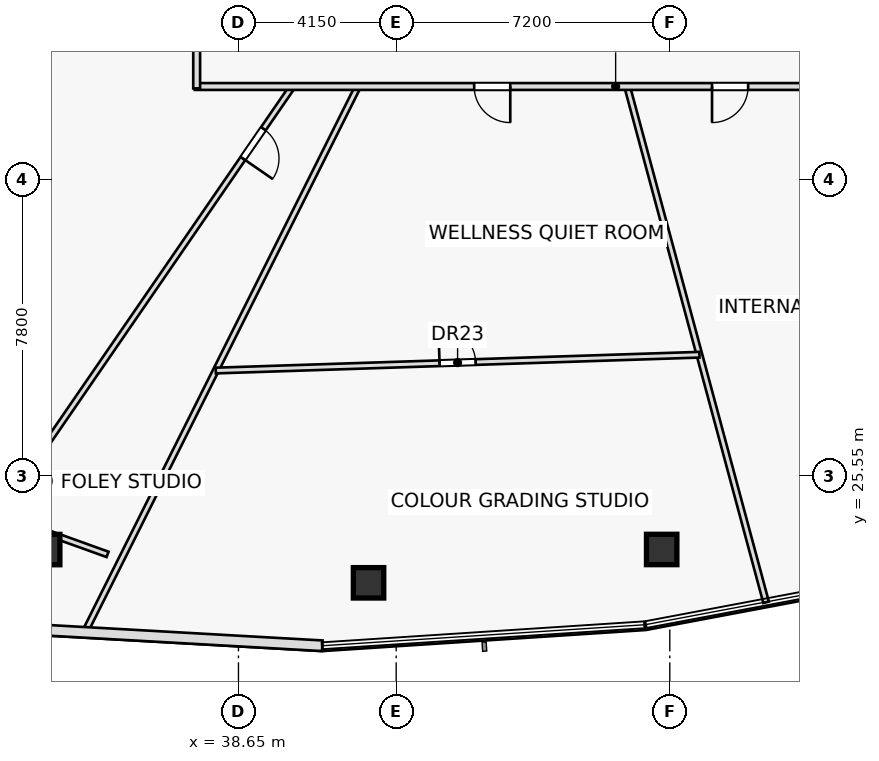
"""IFC4 building model, lengths in metres.
Left out: names, types, materials, properties, quantities, classifications, styles, units other than length and angle.
Written with IfcOpenShell. Run it as: python <this file> out.ifc"""

import sys

from ifc_helpers import new_model, si_unit, direction, frame, frame_2d, origin, origin_2d, place, context, subcontext, project, spatial, rectangle, hollow_rectangle, extrude, element, fill, save


model = new_model("IFC4")
c1 = context("Model", 3, precision=1e-05, world=origin(), true_north=direction((0.0, 1.0)))
c2 = subcontext(c1, "Body", "Model", "MODEL_VIEW")
j1 = project(units=[si_unit("LENGTHUNIT", "METRE"), si_unit("PLANEANGLEUNIT", "RADIAN")], contexts=[c1])
p1 = place(None, origin())
s1 = spatial("IfcSite", under=j1, at=p1, CompositionType="ELEMENT")
p2 = place(p1, origin())
s2 = spatial("IfcBuilding", under=s1, at=p2, CompositionType="ELEMENT")
p3 = place(p2, frame((0.0, 0.0, 54.9)))
s3 = spatial("IfcBuildingStorey", under=s2, at=p3, CompositionType="ELEMENT", Elevation=54.9)
for number, where, z_axis, x_axis in (
    (1, (33.551, 23.615, 0.0), (0.0, 0.0, 1.0), (1.0, 0.0, 0.0)),
    (2, (42.073, 22.74, 0.0), (0.0, 0.0, 1.0), (1.0, 0.0, 0.0)),
    (3, (49.787, 23.618, 0.0), (0.0, 0.0, 1.0), (1.0, 0.0, 0.0)),
):
    element("IfcColumn", number, at=place(p3, frame(where, z_axis=z_axis, x_axis=x_axis)), inside=s3, PredefinedType="COLUMN", context=c2, shape_type="SweptSolid", body=[
        extrude(hollow_rectangle(XDim=0.8, YDim=0.8, WallThickness=0.045, at=origin_2d()), origin(), (0.0, 0.0, 1.0), 3.6),
    ])
p4 = place(p3, frame((22.802, 27.945, 0.0), z_axis=(0.0, 0.0, 1.0), x_axis=(0.941102349209, -0.338121824662, 0.0)))
e4 = element("IfcWall", 4, at=p4, inside=s3, PredefinedType="PARTITIONING", context=c2, shape_type="SweptSolid", body=[
    extrude(rectangle(XDim=13.18, YDim=0.15, at=frame_2d((6.59, 0.0))), origin(), (0.0, 0.0, 1.0), 2.925),
])
p5 = place(p3, frame((37.55, 41.316, 0.0), z_axis=(0.0, 0.0, 1.0), x_axis=(-0.923192857612, -0.384337023528, 0.0)))
e5 = element("IfcWall", 5, at=p5, inside=s3, PredefinedType="PARTITIONING", context=c2, shape_type="SweptSolid", body=[
    extrude(rectangle(XDim=19.369, YDim=0.15, at=frame_2d((9.685, 0.0))), origin(), (0.0, 0.0, 1.0), 2.925),
])
p6 = place(p3, frame((40.07, 35.8, 0.0), z_axis=(0.0, 0.0, 1.0), x_axis=(-0.566803639282, -0.823852920427, 0.0)))
e6 = element("IfcWall", 6, at=p6, inside=s3, PredefinedType="PARTITIONING", context=c2, shape_type="SweptSolid", body=[
    extrude(rectangle(XDim=16.889, YDim=0.15, at=frame_2d((8.444, 0.0))), origin(), (0.0, 0.0, 1.0), 2.975),
])
p7 = place(p6, frame((1.35, 0.0, 0.0)))
e7 = element("IfcOpeningElement", 7, at=p7, cuts=e6, PredefinedType="OPENING", context=c2, shape_type="SweptSolid", body=[
    extrude(rectangle(XDim=0.95, YDim=2.05, at=frame_2d((0.475, 1.025))), frame((0.0, 0.085, 0.0), z_axis=(0.0, -1.0, 0.0), x_axis=(1.0, 0.0, 0.0)), (0.0, 0.0, 1.0), 0.17),
])
p8 = place(p3, frame((41.795, 35.8, 0.0), z_axis=(0.0, 0.0, 1.0), x_axis=(-0.447638840574, -0.894214442072, 0.0)))
e8 = element("IfcWall", 8, at=p8, inside=s3, PredefinedType="PARTITIONING", context=c2, shape_type="SweptSolid", body=[
    extrude(rectangle(XDim=16.073, YDim=0.15, at=frame_2d((8.037, 0.0))), origin(), (0.0, 0.0, 1.0), 2.975),
])
p9 = place(p3, frame((48.878, 35.8, 0.0), z_axis=(0.0, 0.0, 1.0), x_axis=(0.260097424476, -0.965582378558, 0.0)))
e9 = element("IfcWall", 9, at=p9, inside=s3, PredefinedType="PARTITIONING", context=c2, shape_type="SweptSolid", body=[
    extrude(rectangle(XDim=14.056, YDim=0.15, at=frame_2d((7.028, 0.0))), origin(), (0.0, 0.0, 1.0), 2.975),
])
p10 = place(p3, frame((38.053, 28.326, 0.0), z_axis=(0.0, 0.0, 1.0), x_axis=(0.999465503327, 0.032691094503, 0.0)))
e10 = element("IfcWall", 10, at=p10, inside=s3, PredefinedType="PARTITIONING", context=c2, shape_type="SweptSolid", body=[
    extrude(rectangle(XDim=12.733, YDim=0.15, at=frame_2d((6.367, 0.0))), origin(), (0.0, 0.0, 1.0), 2.925),
])
p11 = place(p10, frame((5.892, 0.0, 0.0)))
e11 = element("IfcOpeningElement", 11, at=p11, cuts=e10, PredefinedType="OPENING", context=c2, shape_type="SweptSolid", body=[
    extrude(rectangle(XDim=0.95, YDim=2.05, at=frame_2d((0.475, 1.025))), frame((0.0, 0.085, 0.0), z_axis=(0.0, -1.0, 0.0), x_axis=(1.0, 0.0, 0.0)), (0.0, 0.0, 1.0), 0.17),
])
p12 = place(p3, frame((59.65, 35.8, 0.0), z_axis=(0.0, 0.0, 1.0), x_axis=(-1.0, 0.0, 0.0)))
e12 = element("IfcWall", 12, at=p12, inside=s3, PredefinedType="PARTITIONING", context=c2, shape_type="SweptSolid", body=[
    extrude(rectangle(XDim=22.15, YDim=0.18, at=frame_2d((11.075, 0.0))), origin(), (0.0, 0.0, 1.0), 2.925),
])
p13 = place(p12, frame((2.493, 0.0, 0.0)))
e13 = element("IfcOpeningElement", 13, at=p13, cuts=e12, PredefinedType="OPENING", context=c2, shape_type="SweptSolid", body=[
    extrude(rectangle(XDim=0.95, YDim=2.05, at=frame_2d((0.475, 1.025))), frame((0.0, 0.1, 0.0), z_axis=(0.0, -1.0, 0.0), x_axis=(1.0, 0.0, 0.0)), (0.0, 0.0, 1.0), 0.2),
])
p14 = place(p12, frame((7.588, 0.0, 0.0)))
e14 = element("IfcOpeningElement", 14, at=p14, cuts=e12, PredefinedType="OPENING", context=c2, shape_type="SweptSolid", body=[
    extrude(rectangle(XDim=0.95, YDim=2.05, at=frame_2d((0.475, 1.025))), frame((0.0, 0.1, 0.0), z_axis=(0.0, -1.0, 0.0), x_axis=(1.0, 0.0, 0.0)), (0.0, 0.0, 1.0), 0.2),
])
p15 = place(p12, frame((13.848, 0.0, 0.0)))
e15 = element("IfcOpeningElement", 15, at=p15, cuts=e12, PredefinedType="OPENING", context=c2, shape_type="SweptSolid", body=[
    extrude(rectangle(XDim=0.95, YDim=2.05, at=frame_2d((0.475, 1.025))), frame((0.0, 0.1, 0.0), z_axis=(0.0, -1.0, 0.0), x_axis=(1.0, 0.0, 0.0)), (0.0, 0.0, 1.0), 0.2),
])
p16 = place(p3, frame((37.55, 35.75, 0.0), z_axis=(0.0, 0.0, 1.0), x_axis=(0.0, 1.0, 0.0)))
e16 = element("IfcWall", 16, at=p16, inside=s3, PredefinedType="PARTITIONING", context=c2, shape_type="SweptSolid", body=[
    extrude(rectangle(XDim=12.75, YDim=0.18, at=frame_2d((6.375, 0.0))), origin(), (0.0, 0.0, 1.0), 2.925),
])
p17 = place(p16, frame((2.4, 0.0, 0.0)))
e17 = element("IfcOpeningElement", 17, at=p17, cuts=e16, PredefinedType="OPENING", context=c2, shape_type="SweptSolid", body=[
    extrude(rectangle(XDim=0.95, YDim=2.05, at=frame_2d((0.475, 1.025))), frame((0.0, 0.1, 0.0), z_axis=(0.0, -1.0, 0.0), x_axis=(1.0, 0.0, 0.0)), (0.0, 0.0, 1.0), 0.2),
])
p18 = place(p16, frame((8.547, 0.0, 0.0)))
e18 = element("IfcOpeningElement", 18, at=p18, cuts=e16, PredefinedType="OPENING", context=c2, shape_type="SweptSolid", body=[
    extrude(rectangle(XDim=0.95, YDim=2.05, at=frame_2d((0.475, 1.025))), frame((0.0, 0.1, 0.0), z_axis=(0.0, -1.0, 0.0), x_axis=(1.0, 0.0, 0.0)), (0.0, 0.0, 1.0), 0.2),
])
p19 = place(p3, frame((32.335, 21.564, 0.0), z_axis=(0.0, 0.0, 1.0), x_axis=(0.998416034421, -0.05626208502, 0.0)))
e19 = element("IfcWall", 19, at=p19, inside=s3, PredefinedType="STANDARD", context=c2, shape_type="SweptSolid", body=[
    extrude(rectangle(XDim=8.535, YDim=0.28, at=frame_2d((4.268, 0.0))), origin(), (0.0, 0.0, 1.0), 3.6),
])
p20 = place(p7, origin())
e20 = element("IfcDoor", 20, at=p20, inside=s3, OperationType="SINGLE_SWING_RIGHT", PredefinedType="DOOR", context=c2, shape_type="SweptSolid", body=[
    extrude(rectangle(XDim=0.95, YDim=2.05, at=frame_2d((0.475, 1.025))), frame((0.0, 0.025, 0.0), z_axis=(0.0, -1.0, 0.0), x_axis=(1.0, 0.0, 0.0)), (0.0, 0.0, 1.0), 0.05),
])
fill(e7, e20)
p21 = place(p11, origin())
e21 = element("IfcDoor", 21, at=p21, inside=s3, OperationType="SINGLE_SWING_LEFT", PredefinedType="DOOR", context=c2, shape_type="SweptSolid", body=[
    extrude(rectangle(XDim=0.95, YDim=2.05, at=frame_2d((0.475, 1.025))), frame((0.0, 0.025, 0.0), z_axis=(0.0, -1.0, 0.0), x_axis=(1.0, 0.0, 0.0)), (0.0, 0.0, 1.0), 0.05),
])
fill(e11, e21)
p22 = place(p14, origin())
e22 = element("IfcDoor", 22, at=p22, inside=s3, OperationType="SINGLE_SWING_RIGHT", PredefinedType="DOOR", context=c2, shape_type="SweptSolid", body=[
    extrude(rectangle(XDim=0.95, YDim=2.05, at=frame_2d((0.475, 1.025))), frame((0.0, 0.025, 0.0), z_axis=(0.0, -1.0, 0.0), x_axis=(1.0, 0.0, 0.0)), (0.0, 0.0, 1.0), 0.05),
])
fill(e14, e22)
p23 = place(p15, origin())
e23 = element("IfcDoor", 23, at=p23, inside=s3, OperationType="SINGLE_SWING_LEFT", PredefinedType="DOOR", context=c2, shape_type="SweptSolid", body=[
    extrude(rectangle(XDim=0.95, YDim=2.05, at=frame_2d((0.475, 1.025))), frame((0.0, 0.025, 0.0), z_axis=(0.0, -1.0, 0.0), x_axis=(1.0, 0.0, 0.0)), (0.0, 0.0, 1.0), 0.05),
])
fill(e15, e23)
save(model, sys.argv[1])
